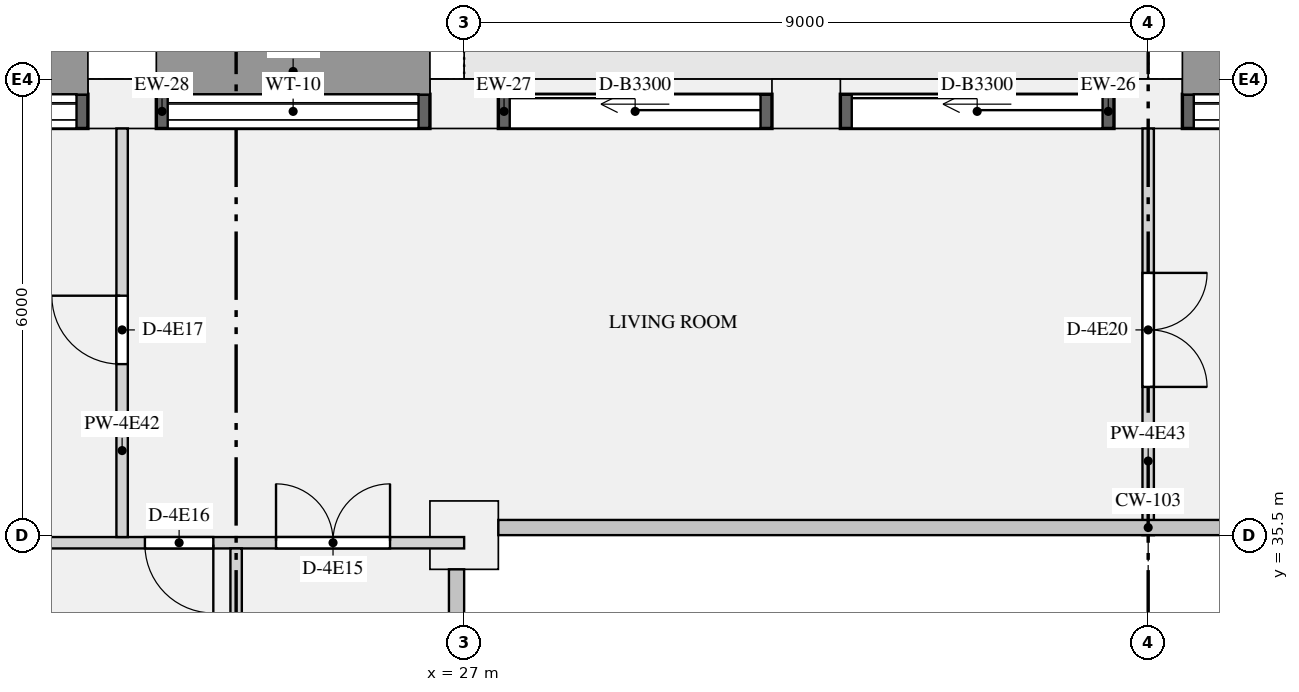
"""IFC4 building model, lengths in metres.
Left out: names, types, materials, properties, quantities, classifications, styles, units other than length and angle.
Written with IfcOpenShell. Run it as: python <this file> out.ifc"""

import sys

from ifc_helpers import new_model, si_unit, direction, frame, frame_2d, origin, origin_2d, place, context, subcontext, project, spatial, rectangle, extrude, element, fill, save


model = new_model("IFC4")
c1 = context("Model", 3, precision=1e-05, world=origin(), true_north=direction((0.0, 1.0)))
c2 = subcontext(c1, "Body", "Model", "MODEL_VIEW")
j1 = project(units=[si_unit("LENGTHUNIT", "METRE"), si_unit("PLANEANGLEUNIT", "RADIAN")], contexts=[c1])
p1 = place(None, origin())
s1 = spatial("IfcSite", under=j1, at=p1, CompositionType="ELEMENT")
p2 = place(p1, origin())
s2 = spatial("IfcBuilding", under=s1, at=p2, CompositionType="ELEMENT")
p3 = place(p2, frame((0.0, 0.0, 232.65)))
s3 = spatial("IfcBuildingStorey", under=s2, at=p3, CompositionType="ELEMENT", Elevation=232.65)
for number, where, z_axis, x_axis in (
    (1, (36.0, 41.175, 0.0), (0.0, 0.0, 1.0), (-1.0, 0.0, 0.0)),
    (2, (31.5, 41.175, 0.0), (0.0, 0.0, 1.0), (-1.0, 0.0, 0.0)),
    (3, (27.0, 41.175, 0.0), (0.0, 0.0, 1.0), (-1.0, 0.0, 0.0)),
    (4, (22.5, 41.175, 0.0), (0.0, 0.0, 1.0), (-1.0, 0.0, 0.0)),
):
    element("IfcColumn", number, at=place(p3, frame(where, z_axis=z_axis, x_axis=x_axis)), inside=s3, PredefinedType="USERDEFINED", context=c2, shape_type="SweptSolid", body=[
        extrude(rectangle(XDim=0.9, YDim=0.65, at=origin_2d()), origin(), (0.0, 0.0, 1.0), 3.15),
    ])
p4 = place(p3, frame((27.0, 35.5, 0.0), z_axis=(0.0, 0.0, 1.0), x_axis=(1.0, 0.0, 0.0)))
e5 = element("IfcColumn", 5, at=p4, inside=s3, PredefinedType="COLUMN", context=c2, shape_type="SweptSolid", body=[
    extrude(rectangle(XDim=0.9, YDim=0.9, at=origin_2d()), origin(), (0.0, 0.0, 1.0), 3.15),
])
p5 = place(p3, frame((40.05, 41.075, 0.9), z_axis=(0.0, 0.0, 1.0), x_axis=(-1.0, 0.0, 0.0)))
e6 = element("IfcWall", 6, at=p5, inside=s3, PredefinedType="SOLIDWALL", context=c2, shape_type="SweptSolid", body=[
    extrude(rectangle(XDim=3.6, YDim=0.45, at=frame_2d((1.8, 0.0))), origin(), (0.0, 0.0, 1.0), 1.9),
])
p6 = place(p5, frame((0.15, 0.0, 0.15)))
e7 = element("IfcOpeningElement", 7, at=p6, cuts=e6, PredefinedType="OPENING", context=c2, shape_type="SweptSolid", body=[
    extrude(rectangle(XDim=3.3, YDim=1.5, at=frame_2d((1.65, 0.75))), frame((0.0, 0.235, 0.0), z_axis=(0.0, -1.0, 0.0), x_axis=(1.0, 0.0, 0.0)), (0.0, 0.0, 1.0), 0.47),
])
p7 = place(p3, frame((35.55, 41.075, 0.0), z_axis=(0.0, 0.0, 1.0), x_axis=(-1.0, 0.0, 0.0)))
e8 = element("IfcWall", 8, at=p7, inside=s3, PredefinedType="SOLIDWALL", context=c2, shape_type="SweptSolid", body=[
    extrude(rectangle(XDim=3.6, YDim=0.45, at=frame_2d((1.8, 0.0))), origin(), (0.0, 0.0, 1.0), 2.8),
])
p8 = place(p7, frame((0.15, 0.0, 0.0)))
e9 = element("IfcOpeningElement", 9, at=p8, cuts=e8, PredefinedType="OPENING", context=c2, shape_type="SweptSolid", body=[
    extrude(rectangle(XDim=3.3, YDim=2.3, at=frame_2d((1.65, 1.15))), frame((0.0, 0.235, 0.0), z_axis=(0.0, -1.0, 0.0), x_axis=(1.0, 0.0, 0.0)), (0.0, 0.0, 1.0), 0.47),
])
p9 = place(p3, frame((31.05, 41.075, 0.0), z_axis=(0.0, 0.0, 1.0), x_axis=(-1.0, 0.0, 0.0)))
e10 = element("IfcWall", 10, at=p9, inside=s3, PredefinedType="SOLIDWALL", context=c2, shape_type="SweptSolid", body=[
    extrude(rectangle(XDim=3.6, YDim=0.45, at=frame_2d((1.8, 0.0))), origin(), (0.0, 0.0, 1.0), 2.8),
])
p10 = place(p9, frame((0.15, 0.0, 0.0)))
e11 = element("IfcOpeningElement", 11, at=p10, cuts=e10, PredefinedType="OPENING", context=c2, shape_type="SweptSolid", body=[
    extrude(rectangle(XDim=3.3, YDim=2.3, at=frame_2d((1.65, 1.15))), frame((0.0, 0.235, 0.0), z_axis=(0.0, -1.0, 0.0), x_axis=(1.0, 0.0, 0.0)), (0.0, 0.0, 1.0), 0.47),
])
p11 = place(p3, frame((26.55, 41.075, 0.9), z_axis=(0.0, 0.0, 1.0), x_axis=(-1.0, 0.0, 0.0)))
e12 = element("IfcWall", 12, at=p11, inside=s3, PredefinedType="SOLIDWALL", context=c2, shape_type="SweptSolid", body=[
    extrude(rectangle(XDim=3.6, YDim=0.45, at=frame_2d((1.8, 0.0))), origin(), (0.0, 0.0, 1.0), 1.9),
])
p12 = place(p11, frame((0.15, 0.0, 0.15)))
e13 = element("IfcOpeningElement", 13, at=p12, cuts=e12, PredefinedType="OPENING", context=c2, shape_type="SweptSolid", body=[
    extrude(rectangle(XDim=3.3, YDim=1.5, at=frame_2d((1.65, 0.75))), frame((0.0, 0.235, 0.0), z_axis=(0.0, -1.0, 0.0), x_axis=(1.0, 0.0, 0.0)), (0.0, 0.0, 1.0), 0.47),
])
p13 = place(p3, frame((22.05, 41.075, 0.9), z_axis=(0.0, 0.0, 1.0), x_axis=(-1.0, 0.0, 0.0)))
e14 = element("IfcWall", 14, at=p13, inside=s3, PredefinedType="SOLIDWALL", context=c2, shape_type="SweptSolid", body=[
    extrude(rectangle(XDim=3.6, YDim=0.45, at=frame_2d((1.8, 0.0))), origin(), (0.0, 0.0, 1.0), 1.9),
])
p14 = place(p13, frame((0.15, 0.0, 0.15)))
e15 = element("IfcOpeningElement", 15, at=p14, cuts=e14, PredefinedType="OPENING", context=c2, shape_type="SweptSolid", body=[
    extrude(rectangle(XDim=3.3, YDim=1.5, at=frame_2d((1.65, 0.75))), frame((0.0, 0.235, 0.0), z_axis=(0.0, -1.0, 0.0), x_axis=(1.0, 0.0, 0.0)), (0.0, 0.0, 1.0), 0.47),
])
p15 = place(p3, frame((15.8, 35.4, 0.0), z_axis=(0.0, 0.0, 1.0), x_axis=(1.0, 0.0, 0.0)))
e16 = element("IfcWall", 16, at=p15, inside=s3, PredefinedType="PARTITIONING", context=c2, shape_type="SweptSolid", body=[
    extrude(rectangle(XDim=11.2, YDim=0.15, at=frame_2d((5.6, 0.0))), origin(), (0.0, 0.0, 1.0), 2.8),
])
p16 = place(p15, frame((8.725, 0.0, 0.0)))
e17 = element("IfcOpeningElement", 17, at=p16, cuts=e16, PredefinedType="OPENING", context=c2, shape_type="SweptSolid", body=[
    extrude(rectangle(XDim=1.5, YDim=2.1, at=frame_2d((0.75, 1.05))), frame((0.0, 0.085, 0.0), z_axis=(0.0, -1.0, 0.0), x_axis=(1.0, 0.0, 0.0)), (0.0, 0.0, 1.0), 0.17),
])
p17 = place(p15, frame((7.0, 0.0, 0.0)))
e18 = element("IfcOpeningElement", 18, at=p17, cuts=e16, PredefinedType="OPENING", context=c2, shape_type="SweptSolid", body=[
    extrude(rectangle(XDim=0.9, YDim=2.1, at=frame_2d((0.45, 1.05))), frame((0.0, 0.085, 0.0), z_axis=(0.0, -1.0, 0.0), x_axis=(1.0, 0.0, 0.0)), (0.0, 0.0, 1.0), 0.17),
])
p18 = place(p15, frame((3.225, 0.0, 0.0)))
e19 = element("IfcOpeningElement", 19, at=p18, cuts=e16, PredefinedType="OPENING", context=c2, shape_type="SweptSolid", body=[
    extrude(rectangle(XDim=0.9, YDim=2.1, at=frame_2d((0.45, 1.05))), frame((0.0, 0.085, 0.0), z_axis=(0.0, -1.0, 0.0), x_axis=(1.0, 0.0, 0.0)), (0.0, 0.0, 1.0), 0.17),
])
p19 = place(p3, frame((24.0, 27.1, 0.0), z_axis=(0.0, 0.0, 1.0), x_axis=(0.0, 1.0, 0.0)))
e20 = element("IfcWall", 20, at=p19, inside=s3, PredefinedType="PARTITIONING", context=c2, shape_type="SweptSolid", body=[
    extrude(rectangle(XDim=8.225, YDim=0.15, at=frame_2d((4.112, 0.0))), origin(), (0.0, 0.0, 1.0), 2.8),
])
p20 = place(p19, frame((0.95, 0.0, 0.0)))
e21 = element("IfcOpeningElement", 21, at=p20, cuts=e20, PredefinedType="OPENING", context=c2, shape_type="SweptSolid", body=[
    extrude(rectangle(XDim=0.9, YDim=2.1, at=frame_2d((0.45, 1.05))), frame((0.0, 0.085, 0.0), z_axis=(0.0, -1.0, 0.0), x_axis=(1.0, 0.0, 0.0)), (0.0, 0.0, 1.0), 0.17),
])
p21 = place(p3, frame((22.5, 35.475, 0.0), z_axis=(0.0, 0.0, 1.0), x_axis=(0.0, 1.0, 0.0)))
e22 = element("IfcWall", 22, at=p21, inside=s3, PredefinedType="PARTITIONING", context=c2, shape_type="SweptSolid", body=[
    extrude(rectangle(XDim=5.375, YDim=0.15, at=frame_2d((2.688, 0.0))), origin(), (0.0, 0.0, 1.0), 2.8),
])
p22 = place(p21, frame((2.275, 0.0, 0.0)))
e23 = element("IfcOpeningElement", 23, at=p22, cuts=e22, PredefinedType="OPENING", context=c2, shape_type="SweptSolid", body=[
    extrude(rectangle(XDim=0.9, YDim=2.1, at=frame_2d((0.45, 1.05))), frame((0.0, 0.085, 0.0), z_axis=(0.0, -1.0, 0.0), x_axis=(1.0, 0.0, 0.0)), (0.0, 0.0, 1.0), 0.17),
])
p23 = place(p3, frame((36.0, 35.5, 0.0), z_axis=(0.0, 0.0, 1.0), x_axis=(0.0, 1.0, 0.0)))
e24 = element("IfcWall", 24, at=p23, inside=s3, PredefinedType="PARTITIONING", context=c2, shape_type="SweptSolid", body=[
    extrude(rectangle(XDim=5.35, YDim=0.15, at=frame_2d((2.675, 0.0))), origin(), (0.0, 0.0, 1.0), 2.8),
])
p24 = place(p23, frame((1.95, 0.0, 0.0)))
e25 = element("IfcOpeningElement", 25, at=p24, cuts=e24, PredefinedType="OPENING", context=c2, shape_type="SweptSolid", body=[
    extrude(rectangle(XDim=1.5, YDim=2.1, at=frame_2d((0.75, 1.05))), frame((0.0, 0.085, 0.0), z_axis=(0.0, -1.0, 0.0), x_axis=(1.0, 0.0, 0.0)), (0.0, 0.0, 1.0), 0.17),
])
p25 = place(p6, origin())
e26 = element("IfcWindow", 26, at=p25, inside=s3, PartitioningType="SINGLE_PANEL", PredefinedType="WINDOW", context=c2, shape_type="SweptSolid", body=[
    extrude(rectangle(XDim=3.3, YDim=1.5, at=frame_2d((1.65, 0.75))), frame((0.0, -0.065, 0.0), z_axis=(0.0, -1.0, 0.0), x_axis=(1.0, 0.0, 0.0)), (0.0, 0.0, 1.0), 0.06),
])
fill(e7, e26)
p26 = place(p8, origin())
e27 = element("IfcDoor", 27, at=p26, inside=s3, OperationType="SLIDING_TO_LEFT", PredefinedType="DOOR", context=c2, shape_type="SweptSolid", body=[
    extrude(rectangle(XDim=3.3, YDim=2.3, at=frame_2d((1.65, 1.15))), frame((0.0, -0.07, 0.0), z_axis=(0.0, -1.0, 0.0), x_axis=(1.0, 0.0, 0.0)), (0.0, 0.0, 1.0), 0.05),
])
fill(e9, e27)
p27 = place(p10, origin())
e28 = element("IfcDoor", 28, at=p27, inside=s3, OperationType="SLIDING_TO_LEFT", PredefinedType="DOOR", context=c2, shape_type="SweptSolid", body=[
    extrude(rectangle(XDim=3.3, YDim=2.3, at=frame_2d((1.65, 1.15))), frame((0.0, -0.07, 0.0), z_axis=(0.0, -1.0, 0.0), x_axis=(1.0, 0.0, 0.0)), (0.0, 0.0, 1.0), 0.05),
])
fill(e11, e28)
p28 = place(p12, origin())
e29 = element("IfcWindow", 29, at=p28, inside=s3, PartitioningType="SINGLE_PANEL", PredefinedType="WINDOW", context=c2, shape_type="SweptSolid", body=[
    extrude(rectangle(XDim=3.3, YDim=1.5, at=frame_2d((1.65, 0.75))), frame((0.0, -0.065, 0.0), z_axis=(0.0, -1.0, 0.0), x_axis=(1.0, 0.0, 0.0)), (0.0, 0.0, 1.0), 0.06),
])
fill(e13, e29)
p29 = place(p14, origin())
e30 = element("IfcWindow", 30, at=p29, inside=s3, PartitioningType="SINGLE_PANEL", PredefinedType="WINDOW", context=c2, shape_type="SweptSolid", body=[
    extrude(rectangle(XDim=3.3, YDim=1.5, at=frame_2d((1.65, 0.75))), frame((0.0, -0.065, 0.0), z_axis=(0.0, -1.0, 0.0), x_axis=(1.0, 0.0, 0.0)), (0.0, 0.0, 1.0), 0.06),
])
fill(e15, e30)
p30 = place(p16, origin())
e31 = element("IfcDoor", 31, at=p30, inside=s3, OperationType="DOUBLE_DOOR_SINGLE_SWING", PredefinedType="DOOR", context=c2, shape_type="SweptSolid", body=[
    extrude(rectangle(XDim=1.5, YDim=2.1, at=frame_2d((0.75, 1.05))), frame((0.0, 0.025, 0.0), z_axis=(0.0, -1.0, 0.0), x_axis=(1.0, 0.0, 0.0)), (0.0, 0.0, 1.0), 0.05),
])
fill(e17, e31)
p31 = place(p17, frame((0.9, 0.0, 0.0), z_axis=(0.0, 0.0, 1.0), x_axis=(-1.0, 0.0, 0.0)))
e32 = element("IfcDoor", 32, at=p31, inside=s3, OperationType="SINGLE_SWING_LEFT", PredefinedType="DOOR", context=c2, shape_type="SweptSolid", body=[
    extrude(rectangle(XDim=0.9, YDim=2.1, at=frame_2d((0.45, 1.05))), frame((0.0, 0.025, 0.0), z_axis=(0.0, -1.0, 0.0), x_axis=(1.0, 0.0, 0.0)), (0.0, 0.0, 1.0), 0.05),
])
fill(e18, e32)
p32 = place(p22, origin())
e33 = element("IfcDoor", 33, at=p32, inside=s3, OperationType="SINGLE_SWING_RIGHT", PredefinedType="DOOR", context=c2, shape_type="SweptSolid", body=[
    extrude(rectangle(XDim=0.9, YDim=2.1, at=frame_2d((0.45, 1.05))), frame((0.0, 0.025, 0.0), z_axis=(0.0, -1.0, 0.0), x_axis=(1.0, 0.0, 0.0)), (0.0, 0.0, 1.0), 0.05),
])
fill(e23, e33)
p33 = place(p24, frame((1.5, 0.0, 0.0), z_axis=(0.0, 0.0, 1.0), x_axis=(-1.0, 0.0, 0.0)))
e34 = element("IfcDoor", 34, at=p33, inside=s3, OperationType="DOUBLE_DOOR_SINGLE_SWING", PredefinedType="DOOR", context=c2, shape_type="SweptSolid", body=[
    extrude(rectangle(XDim=1.5, YDim=2.1, at=frame_2d((0.75, 1.05))), frame((0.0, 0.025, 0.0), z_axis=(0.0, -1.0, 0.0), x_axis=(1.0, 0.0, 0.0)), (0.0, 0.0, 1.0), 0.05),
])
fill(e25, e34)
save(model, sys.argv[1])
